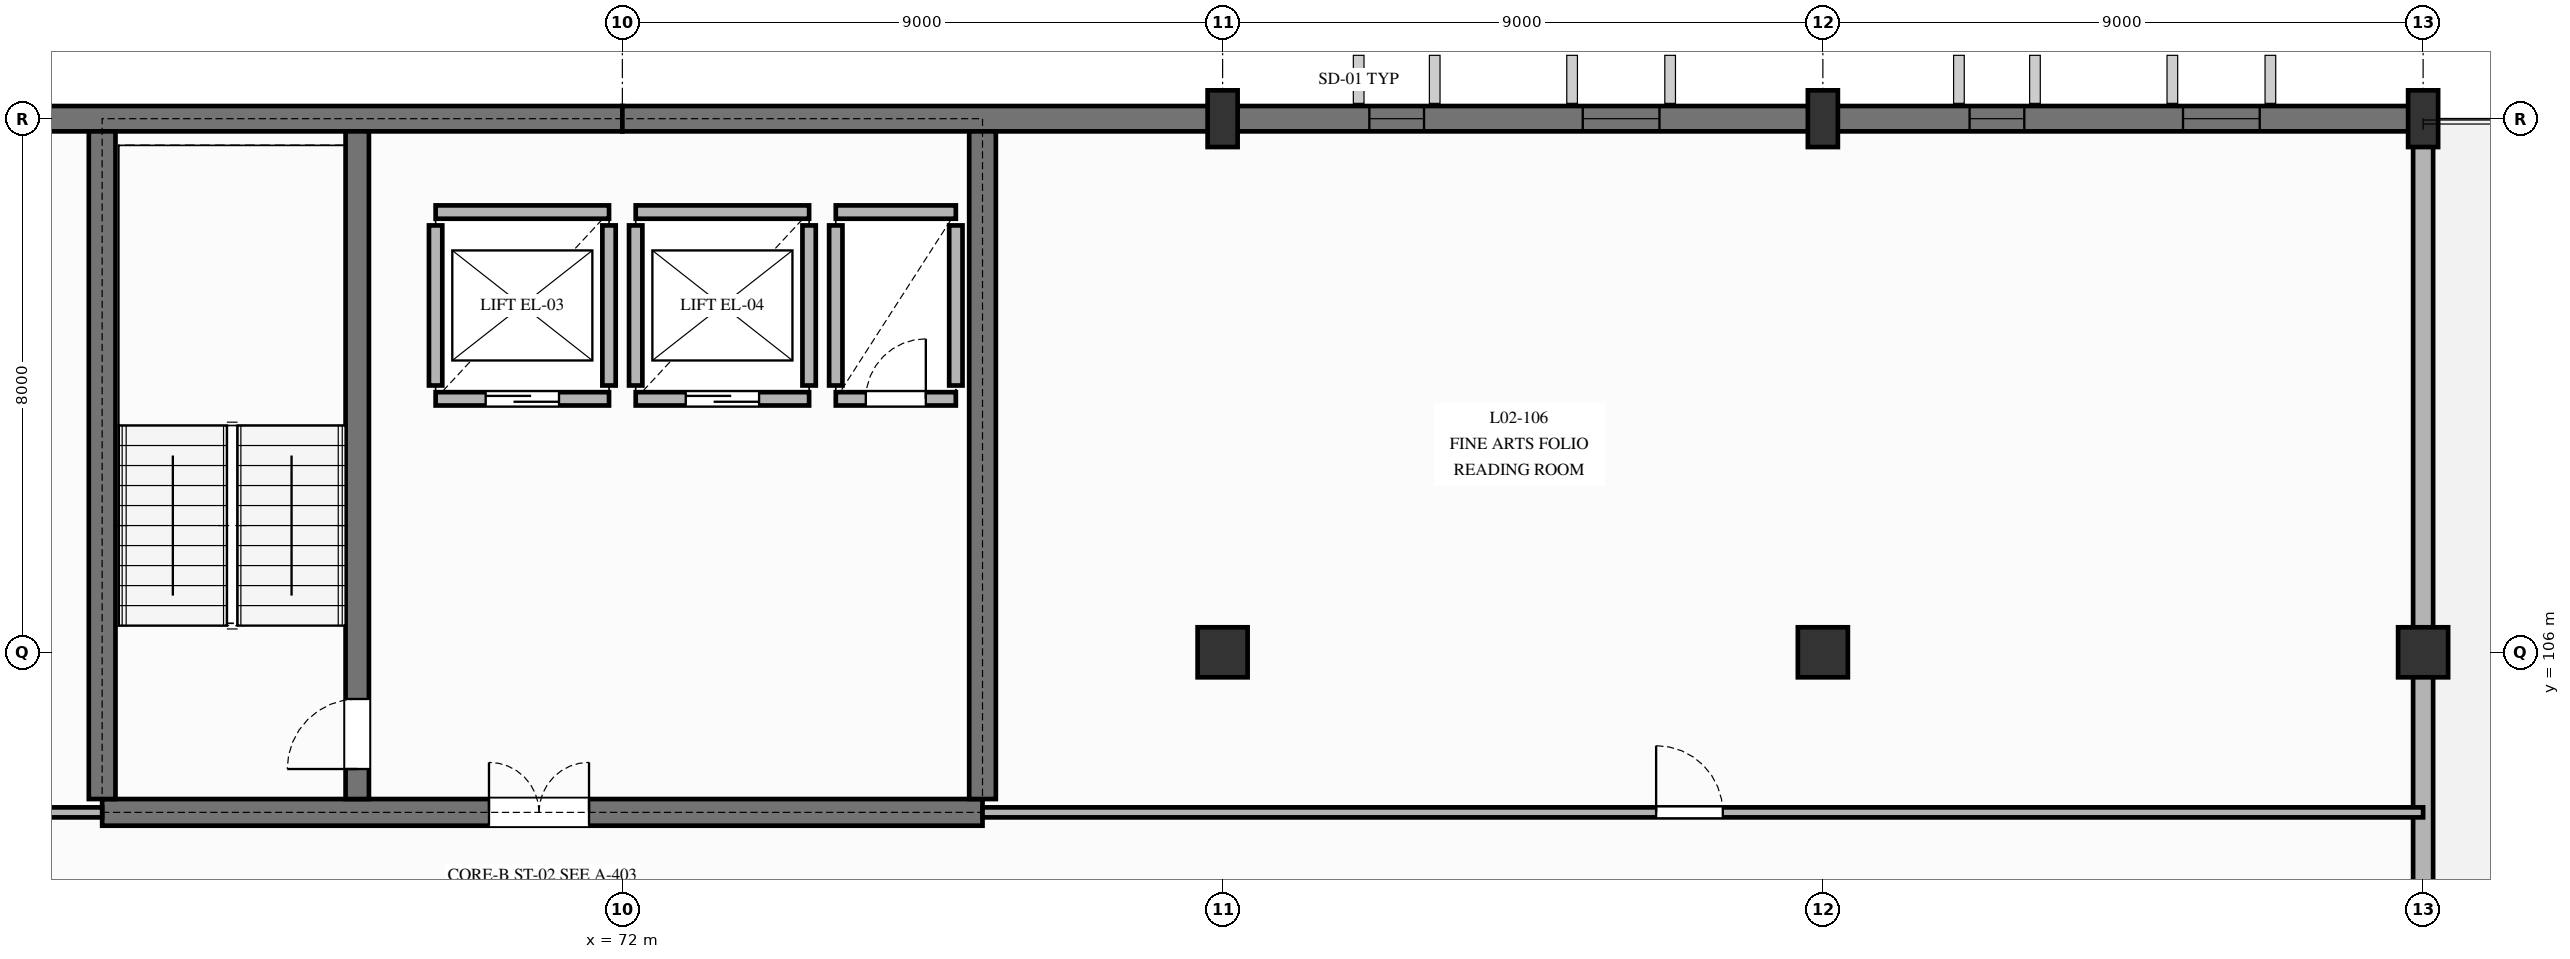
"""IFC4 building model, lengths in metres.
Left out: names, types, materials, properties, quantities, classifications, styles, units other than length and angle.
Written with IfcOpenShell. Run it as: python <this file> out.ifc"""

import sys

from ifc_helpers import new_model, si_unit, direction, frame, frame_2d, origin, origin_2d, place, context, subcontext, project, spatial, rectangle, extrude, element, fill, save


model = new_model("IFC4")
c1 = context("Model", 3, precision=1e-05, world=origin(), true_north=direction((0.0, 1.0)))
c2 = subcontext(c1, "Body", "Model", "MODEL_VIEW")
j1 = project(units=[si_unit("LENGTHUNIT", "METRE"), si_unit("PLANEANGLEUNIT", "RADIAN")], contexts=[c1])
p1 = place(None, origin())
s1 = spatial("IfcSite", under=j1, at=p1, CompositionType="ELEMENT")
p2 = place(p1, origin())
s2 = spatial("IfcBuilding", under=s1, at=p2, CompositionType="ELEMENT")
p3 = place(p2, frame((0.0, 0.0, 8.94)))
s3 = spatial("IfcBuildingStorey", under=s2, at=p3, CompositionType="ELEMENT", Elevation=8.94)
p4 = place(p3, frame((81.0, 106.0, 0.0), z_axis=(0.0, 0.0, 1.0), x_axis=(1.0, 0.0, 0.0)))
e1 = element("IfcColumn", 1, at=p4, inside=s3, PredefinedType="COLUMN", context=c2, shape_type="SweptSolid", body=[
    extrude(rectangle(XDim=0.75, YDim=0.75, at=origin_2d()), origin(), (0.0, 0.0, 1.0), 3.84),
])
p5 = place(p3, frame((81.0, 114.0, 0.0), z_axis=(0.0, 0.0, 1.0), x_axis=(0.0, 1.0, 0.0)))
e2 = element("IfcColumn", 2, at=p5, inside=s3, PredefinedType="COLUMN", context=c2, shape_type="SweptSolid", body=[
    extrude(rectangle(XDim=0.45, YDim=0.85, at=origin_2d()), origin(), (0.0, 0.0, 1.0), 3.84),
])
p6 = place(p3, frame((90.0, 106.0, 0.0), z_axis=(0.0, 0.0, 1.0), x_axis=(1.0, 0.0, 0.0)))
e3 = element("IfcColumn", 3, at=p6, inside=s3, PredefinedType="COLUMN", context=c2, shape_type="SweptSolid", body=[
    extrude(rectangle(XDim=0.75, YDim=0.75, at=origin_2d()), origin(), (0.0, 0.0, 1.0), 3.84),
])
p7 = place(p3, frame((90.0, 114.0, 0.0), z_axis=(0.0, 0.0, 1.0), x_axis=(0.0, 1.0, 0.0)))
e4 = element("IfcColumn", 4, at=p7, inside=s3, PredefinedType="COLUMN", context=c2, shape_type="SweptSolid", body=[
    extrude(rectangle(XDim=0.45, YDim=0.85, at=origin_2d()), origin(), (0.0, 0.0, 1.0), 3.84),
])
p8 = place(p3, frame((99.0, 106.0, 0.0), z_axis=(0.0, 0.0, 1.0), x_axis=(1.0, 0.0, 0.0)))
e5 = element("IfcColumn", 5, at=p8, inside=s3, PredefinedType="COLUMN", context=c2, shape_type="SweptSolid", body=[
    extrude(rectangle(XDim=0.75, YDim=0.75, at=origin_2d()), origin(), (0.0, 0.0, 1.0), 3.84),
])
p9 = place(p3, frame((99.0, 114.0, 0.0), z_axis=(0.0, 0.0, 1.0), x_axis=(0.0, 1.0, 0.0)))
e6 = element("IfcColumn", 6, at=p9, inside=s3, PredefinedType="COLUMN", context=c2, shape_type="SweptSolid", body=[
    extrude(rectangle(XDim=0.45, YDim=0.85, at=origin_2d()), origin(), (0.0, 0.0, 1.0), 3.84),
])
for number, where, z_axis, x_axis in (
    (7, (63.0, 114.0, 0.0), (0.0, 0.0, 1.0), (1.0, 0.0, 0.0)),
    (8, (72.0, 114.0, 0.0), (0.0, 0.0, 1.0), (1.0, 0.0, 0.0)),
):
    element("IfcWall", number, at=place(p3, frame(where, z_axis=z_axis, x_axis=x_axis)), inside=s3, PredefinedType="SOLIDWALL", context=c2, shape_type="SweptSolid", body=[
        extrude(rectangle(XDim=9.0, YDim=0.38, at=frame_2d((4.5, 0.0))), origin(), (0.0, 0.0, 1.0), 3.53),
    ])
p10 = place(p3, frame((81.0, 114.0, 0.0), z_axis=(0.0, 0.0, 1.0), x_axis=(1.0, 0.0, 0.0)))
e9 = element("IfcWall", 9, at=p10, inside=s3, PredefinedType="SOLIDWALL", context=c2, shape_type="SweptSolid", body=[
    extrude(rectangle(XDim=9.0, YDim=0.38, at=frame_2d((4.5, 0.0))), origin(), (0.0, 0.0, 1.0), 3.53),
])
p11 = place(p10, frame((2.2, 0.0, 0.615)))
e10 = element("IfcOpeningElement", 10, at=p11, cuts=e9, PredefinedType="OPENING", context=c2, shape_type="SweptSolid", body=[
    extrude(rectangle(XDim=0.82, YDim=2.15, at=frame_2d((0.41, 1.075))), frame((0.0, 0.2, 0.0), z_axis=(0.0, -1.0, 0.0), x_axis=(1.0, 0.0, 0.0)), (0.0, 0.0, 1.0), 0.4),
])
p12 = place(p10, frame((5.4, 0.0, 0.465)))
e11 = element("IfcOpeningElement", 11, at=p12, cuts=e9, PredefinedType="OPENING", context=c2, shape_type="SweptSolid", body=[
    extrude(rectangle(XDim=1.15, YDim=2.3, at=frame_2d((0.575, 1.15))), frame((0.0, 0.2, 0.0), z_axis=(0.0, -1.0, 0.0), x_axis=(1.0, 0.0, 0.0)), (0.0, 0.0, 1.0), 0.4),
])
p13 = place(p3, frame((90.0, 114.0, 0.0), z_axis=(0.0, 0.0, 1.0), x_axis=(1.0, 0.0, 0.0)))
e12 = element("IfcWall", 12, at=p13, inside=s3, PredefinedType="SOLIDWALL", context=c2, shape_type="SweptSolid", body=[
    extrude(rectangle(XDim=9.0, YDim=0.38, at=frame_2d((4.5, 0.0))), origin(), (0.0, 0.0, 1.0), 3.53),
])
p14 = place(p13, frame((2.2, 0.0, 0.605)))
e13 = element("IfcOpeningElement", 13, at=p14, cuts=e12, PredefinedType="OPENING", context=c2, shape_type="SweptSolid", body=[
    extrude(rectangle(XDim=0.82, YDim=2.15, at=frame_2d((0.41, 1.075))), frame((0.0, 0.2, 0.0), z_axis=(0.0, -1.0, 0.0), x_axis=(1.0, 0.0, 0.0)), (0.0, 0.0, 1.0), 0.4),
])
p15 = place(p13, frame((5.4, 0.0, 0.455)))
e14 = element("IfcOpeningElement", 14, at=p15, cuts=e12, PredefinedType="OPENING", context=c2, shape_type="SweptSolid", body=[
    extrude(rectangle(XDim=1.15, YDim=2.3, at=frame_2d((0.575, 1.15))), frame((0.0, 0.2, 0.0), z_axis=(0.0, -1.0, 0.0), x_axis=(1.0, 0.0, 0.0)), (0.0, 0.0, 1.0), 0.4),
])
p16 = place(p3, frame((99.0, 82.2, 0.0), z_axis=(0.0, 0.0, 1.0), x_axis=(0.0, 1.0, 0.0)))
e15 = element("IfcWall", 15, at=p16, inside=s3, PredefinedType="SOLIDWALL", context=c2, shape_type="SweptSolid", body=[
    extrude(rectangle(XDim=31.8, YDim=0.3, at=frame_2d((15.9, 0.0))), origin(), (0.0, 0.0, 1.0), 2.695),
])
p17 = place(p16, frame((18.2, 0.0, 0.0)))
e16 = element("IfcOpeningElement", 16, at=p17, cuts=e15, PredefinedType="OPENING", context=c2, shape_type="SweptSolid", body=[
    extrude(rectangle(XDim=1.6, YDim=2.25, at=frame_2d((0.8, 1.125))), frame((0.0, 0.16, 0.0), z_axis=(0.0, -1.0, 0.0), x_axis=(1.0, 0.0, 0.0)), (0.0, 0.0, 1.0), 0.32),
])
p18 = place(p16, frame((3.2, 0.0, 0.475)))
e17 = element("IfcOpeningElement", 17, at=p18, cuts=e15, PredefinedType="OPENING", context=c2, shape_type="SweptSolid", body=[
    extrude(rectangle(XDim=1.5, YDim=2.1, at=frame_2d((0.75, 1.05))), frame((0.0, 0.16, 0.0), z_axis=(0.0, -1.0, 0.0), x_axis=(1.0, 0.0, 0.0)), (0.0, 0.0, 1.0), 0.32),
])
p19 = place(p16, frame((9.2, 0.0, 0.825)))
e18 = element("IfcOpeningElement", 18, at=p19, cuts=e15, PredefinedType="OPENING", context=c2, shape_type="SweptSolid", body=[
    extrude(rectangle(XDim=1.05, YDim=1.75, at=frame_2d((0.525, 0.875))), frame((0.0, 0.16, 0.0), z_axis=(0.0, -1.0, 0.0), x_axis=(1.0, 0.0, 0.0)), (0.0, 0.0, 1.0), 0.32),
])
p20 = place(p3, frame((64.2, 103.6, 0.0), z_axis=(0.0, 0.0, 1.0), x_axis=(1.0, 0.0, 0.0)))
e19 = element("IfcWall", 19, at=p20, inside=s3, PredefinedType="SHEAR", context=c2, shape_type="SweptSolid", body=[
    extrude(rectangle(XDim=13.2, YDim=0.4, at=frame_2d((6.6, 0.0))), origin(), (0.0, 0.0, 1.0), 3.53),
])
p21 = place(p20, frame((5.8, 0.0, 0.0)))
e20 = element("IfcOpeningElement", 20, at=p21, cuts=e19, PredefinedType="OPENING", context=c2, shape_type="SweptSolid", body=[
    extrude(rectangle(XDim=1.5, YDim=2.2, at=frame_2d((0.75, 1.1))), frame((0.0, 0.21, 0.0), z_axis=(0.0, -1.0, 0.0), x_axis=(1.0, 0.0, 0.0)), (0.0, 0.0, 1.0), 0.42),
])
for number, where, z_axis, x_axis in (
    (21, (64.2, 103.8, 0.0), (0.0, 0.0, 1.0), (0.0, 1.0, 0.0)),
    (22, (77.4, 103.8, 0.0), (0.0, 0.0, 1.0), (0.0, 1.0, 0.0)),
):
    element("IfcWall", number, at=place(p3, frame(where, z_axis=z_axis, x_axis=x_axis)), inside=s3, PredefinedType="SHEAR", context=c2, shape_type="SweptSolid", body=[
        extrude(rectangle(XDim=10.01, YDim=0.4, at=frame_2d((5.005, 0.0))), origin(), (0.0, 0.0, 1.0), 3.53),
    ])
p22 = place(p3, frame((68.025, 103.8, 0.0), z_axis=(0.0, 0.0, 1.0), x_axis=(0.0, 1.0, 0.0)))
e23 = element("IfcWall", 23, at=p22, inside=s3, PredefinedType="SHEAR", context=c2, shape_type="SweptSolid", body=[
    extrude(rectangle(XDim=10.01, YDim=0.35, at=frame_2d((5.005, 0.0))), origin(), (0.0, 0.0, 1.0), 3.53),
])
p23 = place(p22, frame((0.45, 0.0, 0.0)))
e24 = element("IfcOpeningElement", 24, at=p23, cuts=e23, PredefinedType="OPENING", context=c2, shape_type="SweptSolid", body=[
    extrude(rectangle(XDim=1.05, YDim=2.2, at=frame_2d((0.525, 1.1))), frame((0.0, 0.185, 0.0), z_axis=(0.0, -1.0, 0.0), x_axis=(1.0, 0.0, 0.0)), (0.0, 0.0, 1.0), 0.37),
])
p24 = place(p3, frame((69.2, 109.8, 0.0), z_axis=(0.0, 0.0, 1.0), x_axis=(1.0, 0.0, 0.0)))
e25 = element("IfcWall", 25, at=p24, inside=s3, PredefinedType="PARTITIONING", context=c2, shape_type="SweptSolid", body=[
    extrude(rectangle(XDim=2.6, YDim=0.2, at=frame_2d((1.3, 0.0))), origin(), (0.0, 0.0, 1.0), 3.53),
])
p25 = place(p24, frame((0.75, 0.0, 0.0)))
e26 = element("IfcOpeningElement", 26, at=p25, cuts=e25, PredefinedType="OPENING", context=c2, shape_type="SweptSolid", body=[
    extrude(rectangle(XDim=1.1, YDim=2.15, at=frame_2d((0.55, 1.075))), frame((0.0, 0.11, 0.0), z_axis=(0.0, -1.0, 0.0), x_axis=(1.0, 0.0, 0.0)), (0.0, 0.0, 1.0), 0.22),
])
p26 = place(p3, frame((69.2, 112.6, 0.0), z_axis=(0.0, 0.0, 1.0), x_axis=(1.0, 0.0, 0.0)))
e27 = element("IfcWall", 27, at=p26, inside=s3, PredefinedType="PARTITIONING", context=c2, shape_type="SweptSolid", body=[
    extrude(rectangle(XDim=2.6, YDim=0.2, at=frame_2d((1.3, 0.0))), origin(), (0.0, 0.0, 1.0), 3.53),
])
for number, where, z_axis, x_axis in (
    (28, (69.2, 110.0, 0.0), (0.0, 0.0, 1.0), (0.0, 1.0, 0.0)),
    (29, (71.8, 110.0, 0.0), (0.0, 0.0, 1.0), (0.0, 1.0, 0.0)),
):
    element("IfcWall", number, at=place(p3, frame(where, z_axis=z_axis, x_axis=x_axis)), inside=s3, PredefinedType="PARTITIONING", context=c2, shape_type="SweptSolid", body=[
        extrude(rectangle(XDim=2.4, YDim=0.2, at=frame_2d((1.2, 0.0))), origin(), (0.0, 0.0, 1.0), 3.53),
    ])
p27 = place(p3, frame((72.2, 109.8, 0.0), z_axis=(0.0, 0.0, 1.0), x_axis=(1.0, 0.0, 0.0)))
e30 = element("IfcWall", 30, at=p27, inside=s3, PredefinedType="PARTITIONING", context=c2, shape_type="SweptSolid", body=[
    extrude(rectangle(XDim=2.6, YDim=0.2, at=frame_2d((1.3, 0.0))), origin(), (0.0, 0.0, 1.0), 3.53),
])
p28 = place(p27, frame((0.75, 0.0, 0.0)))
e31 = element("IfcOpeningElement", 31, at=p28, cuts=e30, PredefinedType="OPENING", context=c2, shape_type="SweptSolid", body=[
    extrude(rectangle(XDim=1.1, YDim=2.15, at=frame_2d((0.55, 1.075))), frame((0.0, 0.11, 0.0), z_axis=(0.0, -1.0, 0.0), x_axis=(1.0, 0.0, 0.0)), (0.0, 0.0, 1.0), 0.22),
])
p29 = place(p3, frame((72.2, 112.6, 0.0), z_axis=(0.0, 0.0, 1.0), x_axis=(1.0, 0.0, 0.0)))
e32 = element("IfcWall", 32, at=p29, inside=s3, PredefinedType="PARTITIONING", context=c2, shape_type="SweptSolid", body=[
    extrude(rectangle(XDim=2.6, YDim=0.2, at=frame_2d((1.3, 0.0))), origin(), (0.0, 0.0, 1.0), 3.53),
])
for number, where, z_axis, x_axis in (
    (33, (72.2, 110.0, 0.0), (0.0, 0.0, 1.0), (0.0, 1.0, 0.0)),
    (34, (74.8, 110.0, 0.0), (0.0, 0.0, 1.0), (0.0, 1.0, 0.0)),
):
    element("IfcWall", number, at=place(p3, frame(where, z_axis=z_axis, x_axis=x_axis)), inside=s3, PredefinedType="PARTITIONING", context=c2, shape_type="SweptSolid", body=[
        extrude(rectangle(XDim=2.4, YDim=0.2, at=frame_2d((1.2, 0.0))), origin(), (0.0, 0.0, 1.0), 3.53),
    ])
p30 = place(p3, frame((75.2, 109.8, 0.0), z_axis=(0.0, 0.0, 1.0), x_axis=(1.0, 0.0, 0.0)))
e35 = element("IfcWall", 35, at=p30, inside=s3, PredefinedType="PARTITIONING", context=c2, shape_type="SweptSolid", body=[
    extrude(rectangle(XDim=1.8, YDim=0.2, at=frame_2d((0.9, 0.0))), origin(), (0.0, 0.0, 1.0), 3.53),
])
p31 = place(p30, frame((0.45, 0.0, 0.0)))
e36 = element("IfcOpeningElement", 36, at=p31, cuts=e35, PredefinedType="OPENING", context=c2, shape_type="SweptSolid", body=[
    extrude(rectangle(XDim=0.9, YDim=2.1, at=frame_2d((0.45, 1.05))), frame((0.0, 0.11, 0.0), z_axis=(0.0, -1.0, 0.0), x_axis=(1.0, 0.0, 0.0)), (0.0, 0.0, 1.0), 0.22),
])
p32 = place(p3, frame((75.2, 112.6, 0.0), z_axis=(0.0, 0.0, 1.0), x_axis=(1.0, 0.0, 0.0)))
e37 = element("IfcWall", 37, at=p32, inside=s3, PredefinedType="PARTITIONING", context=c2, shape_type="SweptSolid", body=[
    extrude(rectangle(XDim=1.8, YDim=0.2, at=frame_2d((0.9, 0.0))), origin(), (0.0, 0.0, 1.0), 3.53),
])
for number, where, z_axis, x_axis in (
    (38, (75.2, 110.0, 0.0), (0.0, 0.0, 1.0), (0.0, 1.0, 0.0)),
    (39, (77.0, 110.0, 0.0), (0.0, 0.0, 1.0), (0.0, 1.0, 0.0)),
):
    element("IfcWall", number, at=place(p3, frame(where, z_axis=z_axis, x_axis=x_axis)), inside=s3, PredefinedType="PARTITIONING", context=c2, shape_type="SweptSolid", body=[
        extrude(rectangle(XDim=2.4, YDim=0.2, at=frame_2d((1.2, 0.0))), origin(), (0.0, 0.0, 1.0), 3.53),
    ])
p33 = place(p3, frame((59.4, 103.6, 0.0), z_axis=(0.0, 0.0, 1.0), x_axis=(1.0, 0.0, 0.0)))
e40 = element("IfcWall", 40, at=p33, inside=s3, PredefinedType="PARTITIONING", context=c2, shape_type="SweptSolid", body=[
    extrude(rectangle(XDim=4.8, YDim=0.15, at=frame_2d((2.4, 0.0))), origin(), (0.0, 0.0, 1.0), 3.53),
])
p34 = place(p33, frame((1.6, 0.0, 0.0)))
e41 = element("IfcOpeningElement", 41, at=p34, cuts=e40, PredefinedType="OPENING", context=c2, shape_type="SweptSolid", body=[
    extrude(rectangle(XDim=1.0, YDim=2.15, at=frame_2d((0.5, 1.075))), frame((0.0, 0.085, 0.0), z_axis=(0.0, -1.0, 0.0), x_axis=(1.0, 0.0, 0.0)), (0.0, 0.0, 1.0), 0.17),
])
p35 = place(p3, frame((77.4, 103.6, 0.0), z_axis=(0.0, 0.0, 1.0), x_axis=(1.0, 0.0, 0.0)))
e42 = element("IfcWall", 42, at=p35, inside=s3, PredefinedType="PARTITIONING", context=c2, shape_type="SweptSolid", body=[
    extrude(rectangle(XDim=21.6, YDim=0.15, at=frame_2d((10.8, 0.0))), origin(), (0.0, 0.0, 1.0), 3.53),
])
p36 = place(p35, frame((10.1, 0.0, 0.0)))
e43 = element("IfcOpeningElement", 43, at=p36, cuts=e42, PredefinedType="OPENING", context=c2, shape_type="SweptSolid", body=[
    extrude(rectangle(XDim=1.0, YDim=2.15, at=frame_2d((0.5, 1.075))), frame((0.0, 0.085, 0.0), z_axis=(0.0, -1.0, 0.0), x_axis=(1.0, 0.0, 0.0)), (0.0, 0.0, 1.0), 0.17),
])
p37 = place(p11, origin())
e44 = element("IfcWindow", 44, at=p37, inside=s3, PartitioningType="SINGLE_PANEL", PredefinedType="WINDOW", context=c2, shape_type="SweptSolid", body=[
    extrude(rectangle(XDim=0.82, YDim=2.15, at=frame_2d((0.41, 1.075))), frame((0.0, 0.03, 0.0), z_axis=(0.0, -1.0, 0.0), x_axis=(1.0, 0.0, 0.0)), (0.0, 0.0, 1.0), 0.06),
])
fill(e10, e44)
p38 = place(p12, origin())
e45 = element("IfcWindow", 45, at=p38, inside=s3, PartitioningType="SINGLE_PANEL", PredefinedType="WINDOW", context=c2, shape_type="SweptSolid", body=[
    extrude(rectangle(XDim=1.15, YDim=2.3, at=frame_2d((0.575, 1.15))), frame((0.0, 0.03, 0.0), z_axis=(0.0, -1.0, 0.0), x_axis=(1.0, 0.0, 0.0)), (0.0, 0.0, 1.0), 0.06),
])
fill(e11, e45)
p39 = place(p14, origin())
e46 = element("IfcWindow", 46, at=p39, inside=s3, PartitioningType="SINGLE_PANEL", PredefinedType="WINDOW", context=c2, shape_type="SweptSolid", body=[
    extrude(rectangle(XDim=0.82, YDim=2.15, at=frame_2d((0.41, 1.075))), frame((0.0, 0.03, 0.0), z_axis=(0.0, -1.0, 0.0), x_axis=(1.0, 0.0, 0.0)), (0.0, 0.0, 1.0), 0.06),
])
fill(e13, e46)
p40 = place(p15, origin())
e47 = element("IfcWindow", 47, at=p40, inside=s3, PartitioningType="SINGLE_PANEL", PredefinedType="WINDOW", context=c2, shape_type="SweptSolid", body=[
    extrude(rectangle(XDim=1.15, YDim=2.3, at=frame_2d((0.575, 1.15))), frame((0.0, 0.03, 0.0), z_axis=(0.0, -1.0, 0.0), x_axis=(1.0, 0.0, 0.0)), (0.0, 0.0, 1.0), 0.06),
])
fill(e14, e47)
p41 = place(p21, origin())
e48 = element("IfcDoor", 48, at=p41, inside=s3, OperationType="DOUBLE_DOOR_SINGLE_SWING", PredefinedType="DOOR", context=c2, shape_type="SweptSolid", body=[
    extrude(rectangle(XDim=1.5, YDim=2.2, at=frame_2d((0.75, 1.1))), frame((0.0, 0.025, 0.0), z_axis=(0.0, -1.0, 0.0), x_axis=(1.0, 0.0, 0.0)), (0.0, 0.0, 1.0), 0.05),
])
fill(e20, e48)
p42 = place(p23, origin())
e49 = element("IfcDoor", 49, at=p42, inside=s3, OperationType="SINGLE_SWING_LEFT", PredefinedType="DOOR", context=c2, shape_type="SweptSolid", body=[
    extrude(rectangle(XDim=1.05, YDim=2.2, at=frame_2d((0.525, 1.1))), frame((0.0, 0.025, 0.0), z_axis=(0.0, -1.0, 0.0), x_axis=(1.0, 0.0, 0.0)), (0.0, 0.0, 1.0), 0.05),
])
fill(e24, e49)
p43 = place(p25, origin())
e50 = element("IfcDoor", 50, at=p43, inside=s3, OperationType="SLIDING_TO_LEFT", PredefinedType="DOOR", context=c2, shape_type="SweptSolid", body=[
    extrude(rectangle(XDim=1.1, YDim=2.15, at=frame_2d((0.55, 1.075))), frame((0.0, 0.025, 0.0), z_axis=(0.0, -1.0, 0.0), x_axis=(1.0, 0.0, 0.0)), (0.0, 0.0, 1.0), 0.05),
])
fill(e26, e50)
p44 = place(p28, origin())
e51 = element("IfcDoor", 51, at=p44, inside=s3, OperationType="SLIDING_TO_RIGHT", PredefinedType="DOOR", context=c2, shape_type="SweptSolid", body=[
    extrude(rectangle(XDim=1.1, YDim=2.15, at=frame_2d((0.55, 1.075))), frame((0.0, 0.025, 0.0), z_axis=(0.0, -1.0, 0.0), x_axis=(1.0, 0.0, 0.0)), (0.0, 0.0, 1.0), 0.05),
])
fill(e31, e51)
p45 = place(p31, origin())
e52 = element("IfcDoor", 52, at=p45, inside=s3, OperationType="SINGLE_SWING_RIGHT", PredefinedType="DOOR", context=c2, shape_type="SweptSolid", body=[
    extrude(rectangle(XDim=0.9, YDim=2.1, at=frame_2d((0.45, 1.05))), frame((0.0, 0.025, 0.0), z_axis=(0.0, -1.0, 0.0), x_axis=(1.0, 0.0, 0.0)), (0.0, 0.0, 1.0), 0.05),
])
fill(e36, e52)
p46 = place(p36, origin())
e53 = element("IfcDoor", 53, at=p46, inside=s3, OperationType="SINGLE_SWING_LEFT", PredefinedType="DOOR", context=c2, shape_type="SweptSolid", body=[
    extrude(rectangle(XDim=1.0, YDim=2.15, at=frame_2d((0.5, 1.075))), frame((0.0, 0.025, 0.0), z_axis=(0.0, -1.0, 0.0), x_axis=(1.0, 0.0, 0.0)), (0.0, 0.0, 1.0), 0.05),
])
fill(e43, e53)
save(model, sys.argv[1])
